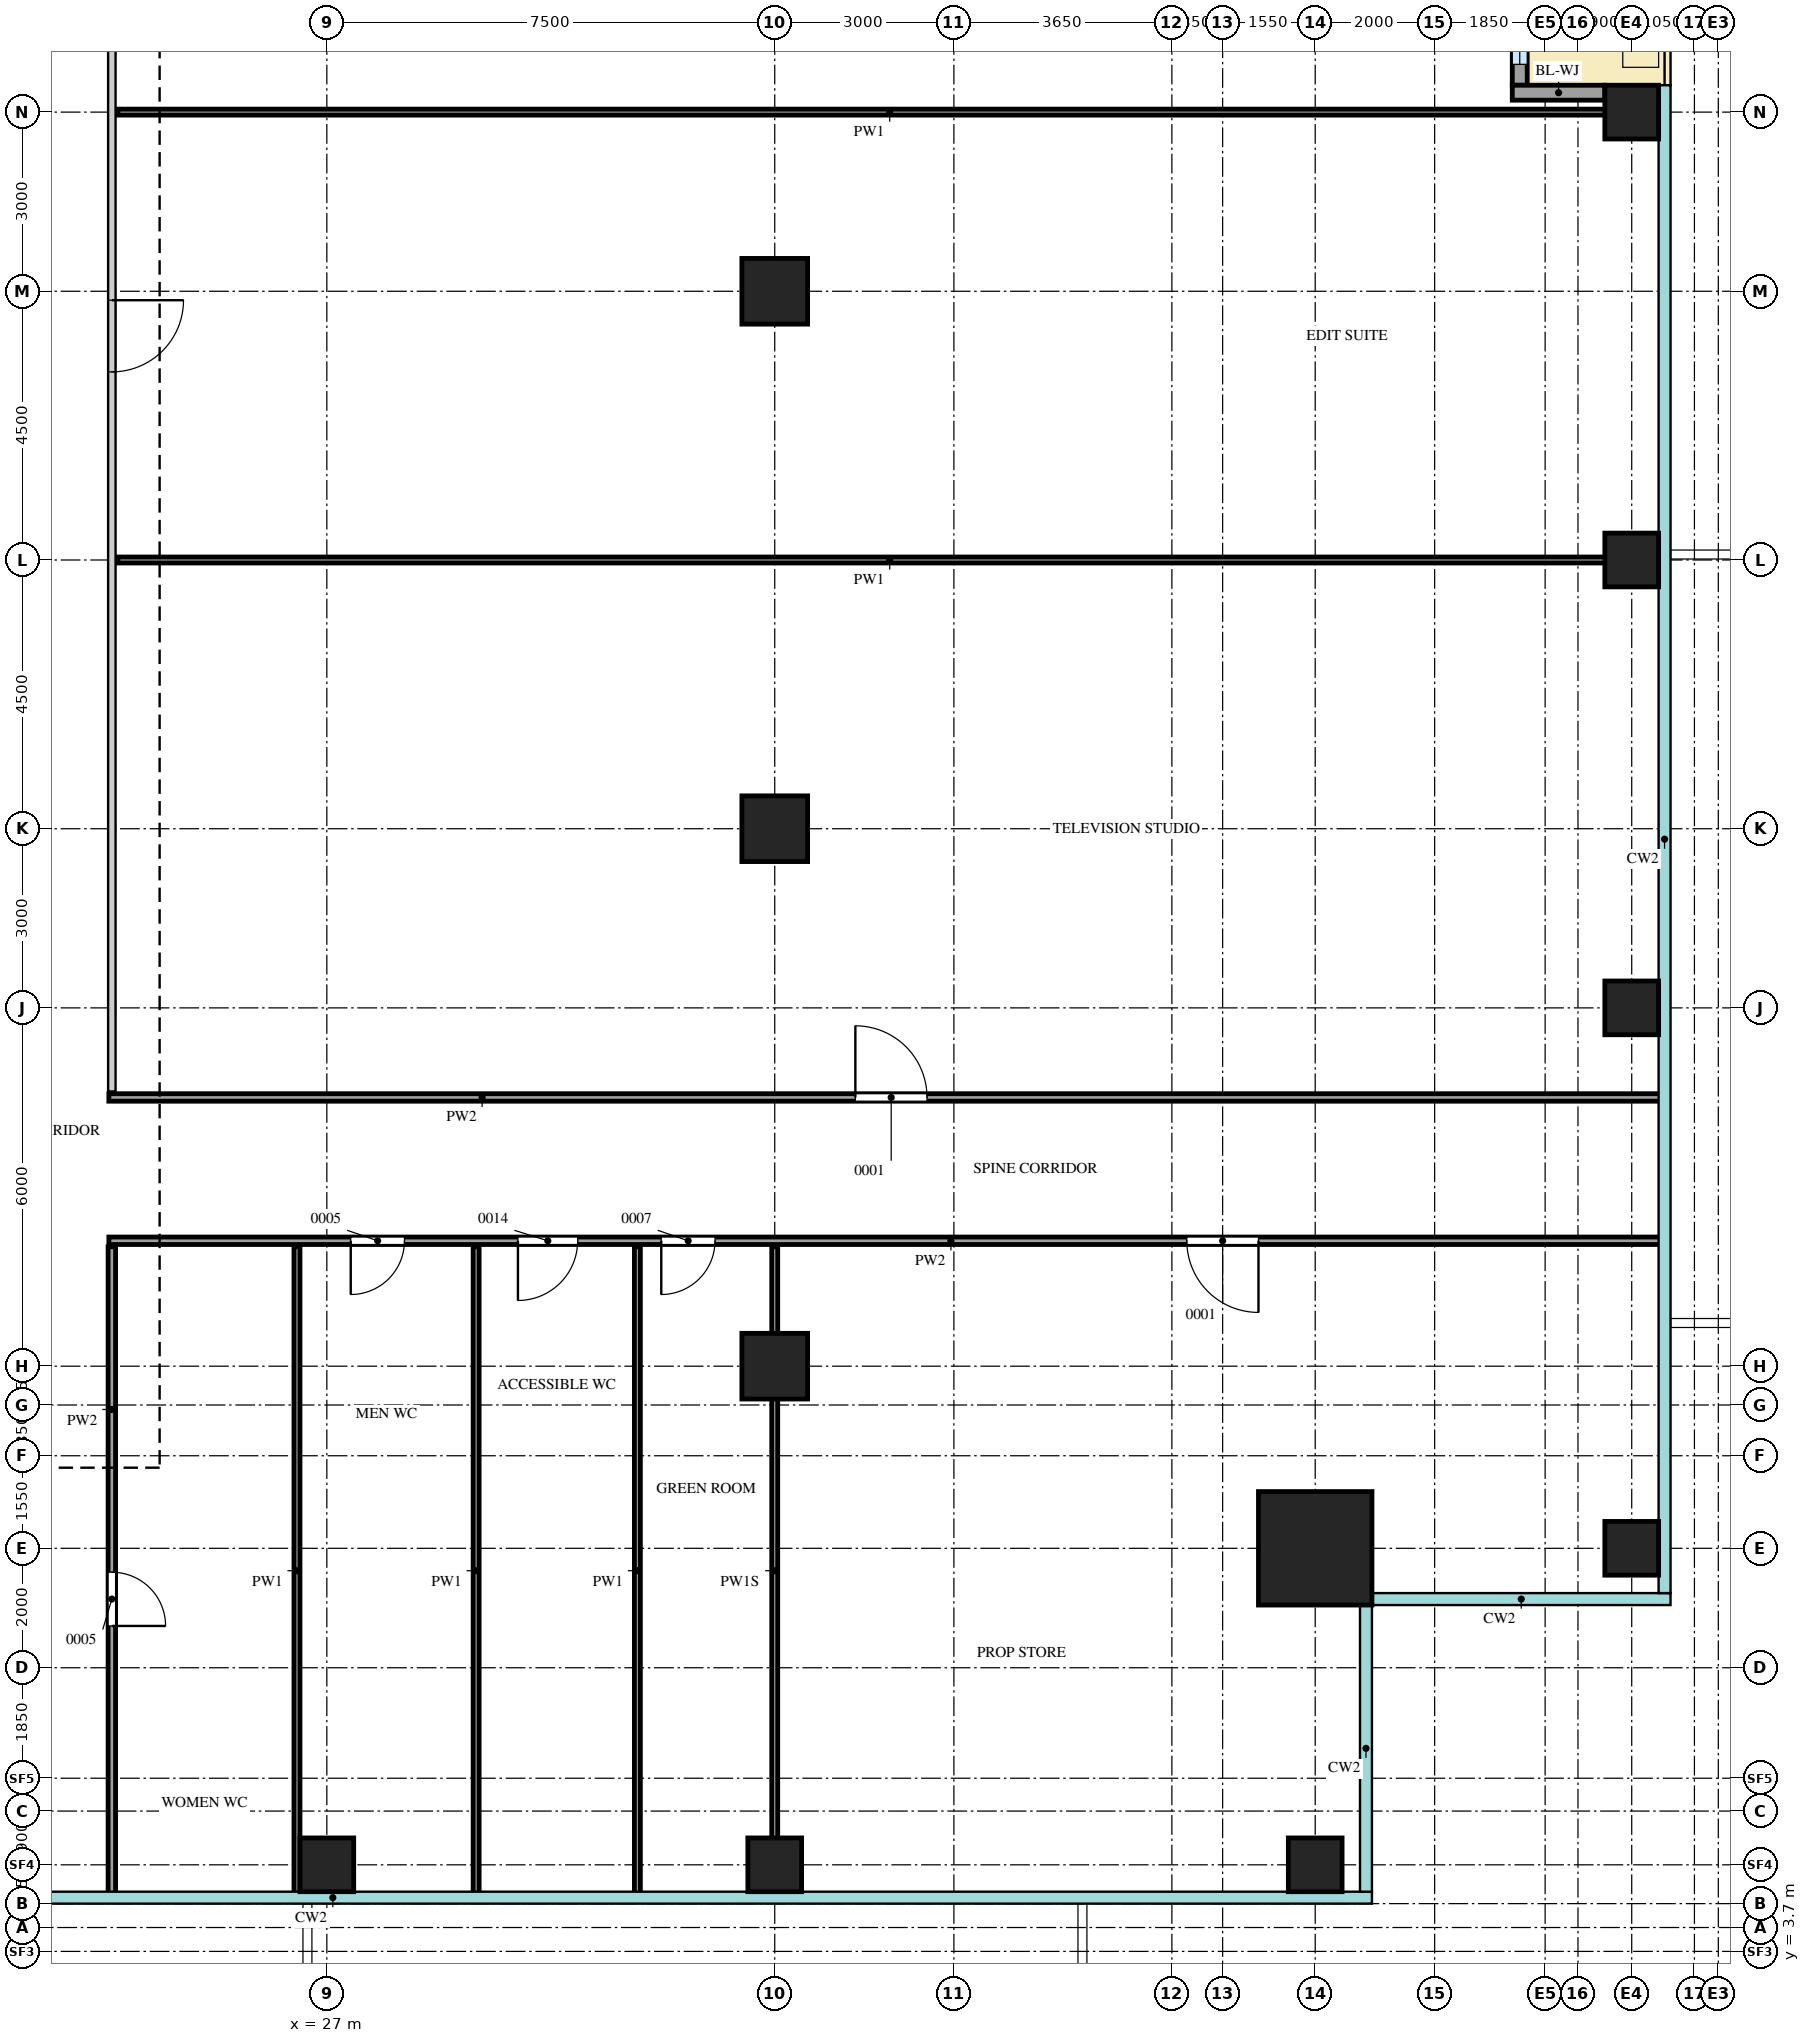
"""IFC4 building model, lengths in metres.
Left out: names, types, materials, properties, quantities, classifications, styles, units other than length and angle.
Written with IfcOpenShell. Run it as: python <this file> out.ifc"""

import sys

from ifc_helpers import new_model, si_unit, direction, frame, frame_2d, origin, origin_2d, place, context, subcontext, project, spatial, rectangle, extrude, source, transform, mapped, element, fill, save


model = new_model("IFC4")
c1 = context("Model", 3, precision=1e-05, world=origin(), true_north=direction((0.0, 1.0)))
c2 = subcontext(c1, "Body", "Model", "MODEL_VIEW")
j1 = project(units=[si_unit("LENGTHUNIT", "METRE"), si_unit("PLANEANGLEUNIT", "RADIAN")], contexts=[c1])
p1 = place(None, origin())
s1 = spatial("IfcSite", under=j1, at=p1, CompositionType="ELEMENT")
p2 = place(p1, origin())
s2 = spatial("IfcBuilding", under=s1, at=p2, CompositionType="ELEMENT")
p3 = place(p2, frame((0.0, 0.0, 254.2)))
s3 = spatial("IfcBuildingStorey", under=s2, at=p3, CompositionType="ELEMENT", Elevation=254.2)
m1 = source(origin(), c2, "Body", "SweptSolid", [
    extrude(rectangle(XDim=1.9, YDim=1.9, at=origin_2d()), origin(), (0.0, 0.0, 1.0), 4.0),
])
p4 = place(p3, frame((43.55, 10.45, 0.0), z_axis=(0.0, 0.0, 1.0), x_axis=(1.0, 0.0, 0.0)))
e1 = element("IfcColumn", 1, at=p4, inside=s3, PredefinedType="COLUMN", context=c2, shape_type="MappedRepresentation", body=[
    mapped(m1, transform((0.0, 0.0, 0.0))),
])
m2 = source(origin(), c2, "Body", "SweptSolid", [
    extrude(rectangle(XDim=0.9, YDim=0.9, at=origin_2d()), origin(), (0.0, 0.0, 1.0), 3.75),
])
for number, where, z_axis, x_axis in (
    (2, (27.0, 5.15, 0.0), (0.0, 0.0, 1.0), (1.0, 0.0, 0.0)),
    (3, (34.5, 5.15, 0.0), (0.0, 0.0, 1.0), (1.0, 0.0, 0.0)),
    (4, (43.55, 5.15, 0.0), (0.0, 0.0, 1.0), (1.0, 0.0, 0.0)),
    (5, (48.85, 10.45, 0.0), (0.0, 0.0, 1.0), (1.0, 0.0, 0.0)),
    (6, (48.85, 19.5, 0.0), (0.0, 0.0, 1.0), (1.0, 0.0, 0.0)),
    (7, (48.85, 27.0, 0.0), (0.0, 0.0, 1.0), (1.0, 0.0, 0.0)),
    (8, (48.85, 34.5, 0.0), (0.0, 0.0, 1.0), (1.0, 0.0, 0.0)),
):
    element("IfcColumn", number, at=place(p3, frame(where, z_axis=z_axis, x_axis=x_axis)), inside=s3, PredefinedType="COLUMN", context=c2, shape_type="MappedRepresentation", body=[
        mapped(m2, transform((0.0, 0.0, 0.0))),
    ])
m3 = source(origin(), c2, "Body", "SweptSolid", [
    extrude(rectangle(XDim=1.1, YDim=1.1, at=origin_2d()), origin(), (0.0, 0.0, 1.0), 3.75),
])
for number, where, z_axis, x_axis in (
    (9, (34.5, 13.5, 0.0), (0.0, 0.0, 1.0), (1.0, 0.0, 0.0)),
    (10, (34.5, 22.5, 0.0), (0.0, 0.0, 1.0), (1.0, 0.0, 0.0)),
    (11, (34.5, 31.5, 0.0), (0.0, 0.0, 1.0), (1.0, 0.0, 0.0)),
):
    element("IfcColumn", number, at=place(p3, frame(where, z_axis=z_axis, x_axis=x_axis)), inside=s3, PredefinedType="COLUMN", context=c2, shape_type="MappedRepresentation", body=[
        mapped(m3, transform((0.0, 0.0, 0.0))),
    ])
m4 = source(origin(), c2, "Body", "SweptSolid", [
    extrude(rectangle(XDim=8.15, YDim=0.25, at=frame_2d((4.075, 0.0))), origin(), (0.0, 0.0, 1.0), 3.2),
])
p5 = place(p3, frame((46.975, 34.95, 0.0), z_axis=(0.0, 0.0, 1.0), x_axis=(0.0, 1.0, 0.0)))
e12 = element("IfcWall", 12, at=p5, inside=s3, PredefinedType="SOLIDWALL", context=c2, shape_type="MappedRepresentation", body=[
    mapped(m4, transform((0.0, 0.0, 0.0))),
])
m5 = source(origin(), c2, "Body", "SweptSolid", [
    extrude(rectangle(XDim=2.5, YDim=2.4, at=frame_2d((1.25, 1.2))), frame((0.0, 0.135, 0.0), z_axis=(0.0, -1.0, 0.0), x_axis=(1.0, 0.0, 0.0)), (0.0, 0.0, 1.0), 0.27),
])
p6 = place(p5, frame((0.35, 0.0, 0.0)))
e13 = element("IfcOpeningElement", 13, at=p6, cuts=e12, PredefinedType="OPENING", context=c2, shape_type="MappedRepresentation", body=[
    mapped(m5, transform((0.0, 0.0, 0.0))),
])
p7 = place(p5, frame((5.25, 0.0, 0.0)))
e14 = element("IfcOpeningElement", 14, at=p7, cuts=e12, PredefinedType="OPENING", context=c2, shape_type="MappedRepresentation", body=[
    mapped(m5, transform((0.0, 0.0, 0.0))),
])
m6 = source(origin(), c2, "Body", "SweptSolid", [
    extrude(rectangle(XDim=1.8, YDim=2.4, at=frame_2d((0.9, 1.2))), frame((0.0, 0.135, 0.0), z_axis=(0.0, -1.0, 0.0), x_axis=(1.0, 0.0, 0.0)), (0.0, 0.0, 1.0), 0.27),
])
p8 = place(p5, frame((3.15, 0.0, 0.0)))
e15 = element("IfcOpeningElement", 15, at=p8, cuts=e12, PredefinedType="OPENING", context=c2, shape_type="MappedRepresentation", body=[
    mapped(m6, transform((0.0, 0.0, 0.0))),
])
m7 = source(origin(), c2, "Body", "SweptSolid", [
    extrude(rectangle(XDim=1.55, YDim=0.25, at=frame_2d((0.775, 0.0))), origin(), (0.0, 0.0, 1.0), 3.2),
])
p9 = place(p3, frame((48.4, 34.825, 0.0), z_axis=(0.0, 0.0, 1.0), x_axis=(-1.0, 0.0, 0.0)))
e16 = element("IfcWall", 16, at=p9, inside=s3, PredefinedType="SOLIDWALL", context=c2, shape_type="MappedRepresentation", body=[
    mapped(m7, transform((0.0, 0.0, 0.0))),
])
m8 = source(origin(), c2, "Body", "SweptSolid", [
    extrude(rectangle(XDim=10.85, YDim=0.125, at=frame_2d((5.425, 0.0))), origin(), (0.0, 0.0, 1.0), 3.8),
])
p10 = place(p3, frame((23.4, 4.65, 0.0), z_axis=(0.0, 0.0, 1.0), x_axis=(0.0, 1.0, 0.0)))
e17 = element("IfcWall", 17, at=p10, inside=s3, PredefinedType="PARTITIONING", context=c2, shape_type="MappedRepresentation", body=[
    mapped(m8, transform((0.0, 0.0, 0.0))),
])
m9 = source(origin(), c2, "Body", "SweptSolid", [
    extrude(rectangle(XDim=0.9, YDim=2.1, at=frame_2d((0.45, 1.05))), frame((0.0, 0.073, 0.0), z_axis=(0.0, -1.0, 0.0), x_axis=(1.0, 0.0, 0.0)), (0.0, 0.0, 1.0), 0.145),
])
p11 = place(p10, frame((4.5, 0.0, 0.0)))
e18 = element("IfcOpeningElement", 18, at=p11, cuts=e17, PredefinedType="OPENING", context=c2, shape_type="MappedRepresentation", body=[
    mapped(m9, transform((0.0, 0.0, 0.0))),
])
m10 = source(origin(), c2, "Body", "SweptSolid", [
    extrude(rectangle(XDim=10.85, YDim=0.1, at=frame_2d((5.425, 0.0))), origin(), (0.0, 0.0, 1.0), 3.8),
])
for number, where, z_axis, x_axis in (
    (19, (26.5, 4.65, 0.0), (0.0, 0.0, 1.0), (0.0, 1.0, 0.0)),
    (20, (29.5, 4.65, 0.0), (0.0, 0.0, 1.0), (0.0, 1.0, 0.0)),
    (21, (32.2, 4.65, 0.0), (0.0, 0.0, 1.0), (0.0, 1.0, 0.0)),
):
    element("IfcWall", number, at=place(p3, frame(where, z_axis=z_axis, x_axis=x_axis)), inside=s3, PredefinedType="PARTITIONING", context=c2, shape_type="MappedRepresentation", body=[
        mapped(m10, transform((0.0, 0.0, 0.0))),
    ])
m11 = source(origin(), c2, "Body", "SweptSolid", [
    extrude(rectangle(XDim=10.85, YDim=0.1, at=frame_2d((5.425, 0.0))), origin(), (0.0, 0.0, 1.0), 3.35),
])
p12 = place(p3, frame((34.5, 4.65, 0.0), z_axis=(0.0, 0.0, 1.0), x_axis=(0.0, 1.0, 0.0)))
e22 = element("IfcWall", 22, at=p12, inside=s3, PredefinedType="PARTITIONING", context=c2, shape_type="MappedRepresentation", body=[
    mapped(m11, transform((0.0, 0.0, 0.0))),
])
m12 = source(origin(), c2, "Body", "SweptSolid", [
    extrude(rectangle(XDim=26.0, YDim=0.125, at=frame_2d((13.0, 0.0))), origin(), (0.0, 0.0, 1.0), 3.8),
])
p13 = place(p3, frame((23.35, 15.6, 0.0), z_axis=(0.0, 0.0, 1.0), x_axis=(1.0, 0.0, 0.0)))
e23 = element("IfcWall", 23, at=p13, inside=s3, PredefinedType="PARTITIONING", context=c2, shape_type="MappedRepresentation", body=[
    mapped(m12, transform((0.0, 0.0, 0.0))),
])
p14 = place(p13, frame((4.05, 0.0, 0.0)))
e24 = element("IfcOpeningElement", 24, at=p14, cuts=e23, PredefinedType="OPENING", context=c2, shape_type="MappedRepresentation", body=[
    mapped(m9, transform((0.0, 0.0, 0.0))),
])
m13 = source(origin(), c2, "Body", "SweptSolid", [
    extrude(rectangle(XDim=1.0, YDim=2.1, at=frame_2d((0.5, 1.05))), frame((0.0, 0.073, 0.0), z_axis=(0.0, -1.0, 0.0), x_axis=(1.0, 0.0, 0.0)), (0.0, 0.0, 1.0), 0.145),
])
p15 = place(p13, frame((6.85, 0.0, 0.0)))
e25 = element("IfcOpeningElement", 25, at=p15, cuts=e23, PredefinedType="OPENING", context=c2, shape_type="MappedRepresentation", body=[
    mapped(m13, transform((0.0, 0.0, 0.0))),
])
p16 = place(p13, frame((9.25, 0.0, 0.0)))
e26 = element("IfcOpeningElement", 26, at=p16, cuts=e23, PredefinedType="OPENING", context=c2, shape_type="MappedRepresentation", body=[
    mapped(m9, transform((0.0, 0.0, 0.0))),
])
m14 = source(origin(), c2, "Body", "SweptSolid", [
    extrude(rectangle(XDim=1.2, YDim=2.1, at=frame_2d((0.6, 1.05))), frame((0.0, 0.073, 0.0), z_axis=(0.0, -1.0, 0.0), x_axis=(1.0, 0.0, 0.0)), (0.0, 0.0, 1.0), 0.145),
])
p17 = place(p13, frame((18.05, 0.0, 0.0)))
e27 = element("IfcOpeningElement", 27, at=p17, cuts=e23, PredefinedType="OPENING", context=c2, shape_type="MappedRepresentation", body=[
    mapped(m14, transform((0.0, 0.0, 0.0))),
])
p18 = place(p3, frame((23.35, 18.0, 0.0), z_axis=(0.0, 0.0, 1.0), x_axis=(1.0, 0.0, 0.0)))
e28 = element("IfcWall", 28, at=p18, inside=s3, PredefinedType="PARTITIONING", context=c2, shape_type="MappedRepresentation", body=[
    mapped(m12, transform((0.0, 0.0, 0.0))),
])
p19 = place(p18, frame((12.5, 0.0, 0.0)))
e29 = element("IfcOpeningElement", 29, at=p19, cuts=e28, PredefinedType="OPENING", context=c2, shape_type="MappedRepresentation", body=[
    mapped(m14, transform((0.0, 0.0, 0.0))),
])
m15 = source(origin(), c2, "Body", "SweptSolid", [
    extrude(rectangle(XDim=20.8, YDim=0.125, at=frame_2d((10.4, 0.0))), origin(), (0.0, 0.0, 1.0), 3.8),
])
p20 = place(p3, frame((23.4, 18.1, 0.0), z_axis=(0.0, 0.0, 1.0), x_axis=(0.0, 1.0, 0.0)))
e30 = element("IfcWall", 30, at=p20, inside=s3, PredefinedType="PARTITIONING", context=c2, shape_type="MappedRepresentation", body=[
    mapped(m15, transform((0.0, 0.0, 0.0))),
])
p21 = place(p20, frame((12.05, 0.0, 0.0)))
e31 = element("IfcOpeningElement", 31, at=p21, cuts=e30, PredefinedType="OPENING", context=c2, shape_type="MappedRepresentation", body=[
    mapped(m14, transform((0.0, 0.0, 0.0))),
])
m16 = source(origin(), c2, "Body", "SweptSolid", [
    extrude(rectangle(XDim=25.85, YDim=0.1, at=frame_2d((12.925, 0.0))), origin(), (0.0, 0.0, 1.0), 3.8),
])
for number, where, z_axis, x_axis in (
    (32, (23.5, 27.0, 0.0), (0.0, 0.0, 1.0), (1.0, 0.0, 0.0)),
    (33, (23.5, 34.5, 0.0), (0.0, 0.0, 1.0), (1.0, 0.0, 0.0)),
):
    element("IfcWall", number, at=place(p3, frame(where, z_axis=z_axis, x_axis=x_axis)), inside=s3, PredefinedType="PARTITIONING", context=c2, shape_type="MappedRepresentation", body=[
        mapped(m16, transform((0.0, 0.0, 0.0))),
    ])
m17 = source(origin(), c2, "Body", "SweptSolid", [
    extrude(rectangle(XDim=2.5, YDim=2.4, at=frame_2d((1.25, 1.2))), frame((0.0, 0.03, 0.0), z_axis=(0.0, -1.0, 0.0), x_axis=(1.0, 0.0, 0.0)), (0.0, 0.0, 1.0), 0.06),
])
p22 = place(p6, origin())
e34 = element("IfcWindow", 34, at=p22, inside=s3, PartitioningType="SINGLE_PANEL", PredefinedType="WINDOW", context=c2, shape_type="MappedRepresentation", body=[
    mapped(m17, transform((0.0, 0.0, 0.0))),
])
fill(e13, e34)
m18 = source(origin(), c2, "Body", "SweptSolid", [
    extrude(rectangle(XDim=0.9, YDim=2.1, at=frame_2d((0.45, 1.05))), frame((0.0, 0.025, 0.0), z_axis=(0.0, -1.0, 0.0), x_axis=(1.0, 0.0, 0.0)), (0.0, 0.0, 1.0), 0.05),
])
p23 = place(p11, origin())
e35 = element("IfcDoor", 35, at=p23, inside=s3, OperationType="SINGLE_SWING_LEFT", PredefinedType="DOOR", context=c2, shape_type="MappedRepresentation", body=[
    mapped(m18, transform((0.0, 0.0, 0.0))),
])
fill(e18, e35)
p24 = place(p14, origin())
e36 = element("IfcDoor", 36, at=p24, inside=s3, OperationType="SINGLE_SWING_LEFT", PredefinedType="DOOR", context=c2, shape_type="MappedRepresentation", body=[
    mapped(m18, transform((0.0, 0.0, 0.0))),
])
fill(e24, e36)
m19 = source(origin(), c2, "Body", "SweptSolid", [
    extrude(rectangle(XDim=1.0, YDim=2.1, at=frame_2d((0.5, 1.05))), frame((0.0, 0.025, 0.0), z_axis=(0.0, -1.0, 0.0), x_axis=(1.0, 0.0, 0.0)), (0.0, 0.0, 1.0), 0.05),
])
p25 = place(p15, origin())
e37 = element("IfcDoor", 37, at=p25, inside=s3, OperationType="SINGLE_SWING_LEFT", PredefinedType="DOOR", context=c2, shape_type="MappedRepresentation", body=[
    mapped(m19, transform((0.0, 0.0, 0.0))),
])
fill(e25, e37)
p26 = place(p16, origin())
e38 = element("IfcDoor", 38, at=p26, inside=s3, OperationType="SINGLE_SWING_LEFT", PredefinedType="DOOR", context=c2, shape_type="MappedRepresentation", body=[
    mapped(m18, transform((0.0, 0.0, 0.0))),
])
fill(e26, e38)
m20 = source(origin(), c2, "Body", "SweptSolid", [
    extrude(rectangle(XDim=1.2, YDim=2.1, at=frame_2d((0.6, 1.05))), frame((0.0, 0.025, 0.0), z_axis=(0.0, -1.0, 0.0), x_axis=(1.0, 0.0, 0.0)), (0.0, 0.0, 1.0), 0.05),
])
p27 = place(p17, origin())
e39 = element("IfcDoor", 39, at=p27, inside=s3, OperationType="SINGLE_SWING_RIGHT", PredefinedType="DOOR", context=c2, shape_type="MappedRepresentation", body=[
    mapped(m20, transform((0.0, 0.0, 0.0))),
])
fill(e27, e39)
p28 = place(p19, origin())
e40 = element("IfcDoor", 40, at=p28, inside=s3, OperationType="SINGLE_SWING_RIGHT", PredefinedType="DOOR", context=c2, shape_type="MappedRepresentation", body=[
    mapped(m20, transform((0.0, 0.0, 0.0))),
])
fill(e29, e40)
p29 = place(p21, origin())
e41 = element("IfcDoor", 41, at=p29, inside=s3, OperationType="SINGLE_SWING_RIGHT", PredefinedType="DOOR", context=c2, shape_type="MappedRepresentation", body=[
    mapped(m20, transform((0.0, 0.0, 0.0))),
])
fill(e31, e41)
save(model, sys.argv[1])
